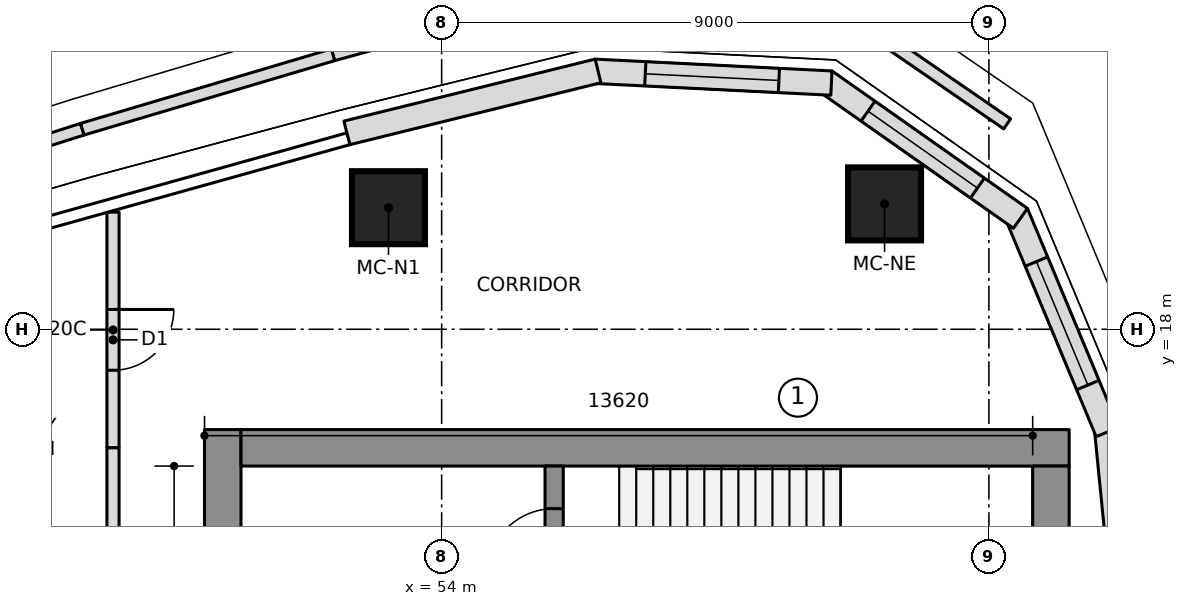
"""IFC4 building model, lengths in metres.
Left out: names, types, materials, properties, quantities, classifications, styles, units other than length and angle.
Written with IfcOpenShell. Run it as: python <this file> out.ifc"""

import sys

from ifc_helpers import new_model, si_unit, direction, frame, frame_2d, origin, origin_2d, place, context, subcontext, project, spatial, polyline, rectangle, outline, extrude, element, fill, save


model = new_model("IFC4")
c1 = context("Model", 3, precision=1e-05, world=origin(), true_north=direction((0.0, 1.0)))
c2 = subcontext(c1, "Body", "Model", "MODEL_VIEW")
j1 = project(units=[si_unit("LENGTHUNIT", "METRE"), si_unit("PLANEANGLEUNIT", "RADIAN")], contexts=[c1])
p1 = place(None, origin())
s1 = spatial("IfcSite", under=j1, at=p1, CompositionType="ELEMENT")
p2 = place(p1, origin())
s2 = spatial("IfcBuilding", under=s1, at=p2, CompositionType="ELEMENT")
p3 = place(p2, frame((0.0, 0.0, 216.2)))
s3 = spatial("IfcBuildingStorey", under=s2, at=p3, CompositionType="ELEMENT", Elevation=216.2)
p4 = place(p3, frame((50.4, 6.65, 0.0), z_axis=(0.0, 0.0, 1.0), x_axis=(0.0, 1.0, 0.0)))
e1 = element("IfcWall", 1, at=p4, inside=s3, PredefinedType="SHEAR", context=c2, shape_type="SweptSolid", body=[
    extrude(rectangle(XDim=9.7, YDim=0.6, at=frame_2d((4.85, 0.0))), origin(), (0.0, 0.0, 1.0), 4.6),
])
p5 = place(p4, frame((6.5, 0.0, 0.0)))
e2 = element("IfcOpeningElement", 2, at=p5, cuts=e1, PredefinedType="OPENING", context=c2, shape_type="SweptSolid", body=[
    extrude(rectangle(XDim=1.1, YDim=2.1, at=frame_2d((0.55, 1.05))), frame((0.0, 0.31, 0.0), z_axis=(0.0, -1.0, 0.0), x_axis=(1.0, 0.0, 0.0)), (0.0, 0.0, 1.0), 0.62),
])
p6 = place(p3, frame((50.7, 16.05, 0.0), z_axis=(0.0, 0.0, 1.0), x_axis=(1.0, 0.0, 0.0)))
e3 = element("IfcWall", 3, at=p6, inside=s3, PredefinedType="SHEAR", context=c2, shape_type="SweptSolid", body=[
    extrude(rectangle(XDim=13.62, YDim=0.6, at=frame_2d((6.81, 0.0))), origin(), (0.0, 0.0, 1.0), 4.6),
])
p7 = place(p3, frame((64.02, 7.502, 0.0), z_axis=(0.0, 0.0, 1.0), x_axis=(0.0, 1.0, 0.0)))
e4 = element("IfcWall", 4, at=p7, inside=s3, PredefinedType="SHEAR", context=c2, shape_type="SweptSolid", body=[
    extrude(rectangle(XDim=8.248, YDim=0.6, at=frame_2d((4.124, 0.0))), origin(), (0.0, 0.0, 1.0), 4.6),
])
p8 = place(p3, frame((55.85, 10.35, 0.0), z_axis=(0.0, 0.0, 1.0), x_axis=(0.0, 1.0, 0.0)))
e5 = element("IfcWall", 5, at=p8, inside=s3, PredefinedType="SHEAR", context=c2, shape_type="SweptSolid", body=[
    extrude(rectangle(XDim=5.4, YDim=0.3, at=frame_2d((2.7, 0.0))), origin(), (0.0, 0.0, 1.0), 4.6),
])
p9 = place(p8, frame((1.43, 0.0, 0.0)))
e6 = element("IfcOpeningElement", 6, at=p9, cuts=e5, PredefinedType="OPENING", context=c2, shape_type="SweptSolid", body=[
    extrude(rectangle(XDim=1.1, YDim=2.1, at=frame_2d((0.55, 1.05))), frame((0.0, 0.16, 0.0), z_axis=(0.0, -1.0, 0.0), x_axis=(1.0, 0.0, 0.0)), (0.0, 0.0, 1.0), 0.32),
])
p10 = place(p8, frame((3.6, 0.0, 0.0)))
e7 = element("IfcOpeningElement", 7, at=p10, cuts=e5, PredefinedType="OPENING", context=c2, shape_type="SweptSolid", body=[
    extrude(rectangle(XDim=1.1, YDim=2.1, at=frame_2d((0.55, 1.05))), frame((0.0, 0.16, 0.0), z_axis=(0.0, -1.0, 0.0), x_axis=(1.0, 0.0, 0.0)), (0.0, 0.0, 1.0), 0.32),
])
for number, where, z_axis, x_axis in (
    (8, (61.284, 20.062, 0.0), (0.0, 0.0, 1.0), (1.0, 0.0, 0.0)),
    (9, (53.125, 20.0, 0.0), (0.0, 0.0, 1.0), (1.0, 0.0, 0.0)),
):
    element("IfcColumn", number, at=place(p3, frame(where, z_axis=z_axis, x_axis=x_axis)), inside=s3, PredefinedType="COLUMN", context=c2, shape_type="SweptSolid", body=[
        extrude(rectangle(XDim=1.2, YDim=1.2, at=origin_2d()), origin(), (0.0, 0.0, 1.0), 4.6),
    ])
p11 = place(p3, frame((65.342, 12.264, 0.0), z_axis=(0.0, 0.0, 1.0), x_axis=(-0.098718218066, 0.995115427185, 0.0)))
e10 = element("IfcWall", 10, at=p11, inside=s3, PredefinedType="NOTDEFINED", context=c2, shape_type="SweptSolid", body=[
    extrude(outline(polyline([(-0.003, -0.2), (4.123, -0.2), (4.063, 0.2), (0.003, 0.2), (-0.003, -0.2)])), origin(), (0.0, 0.0, 1.0), 4.3),
])
p12 = place(p3, frame((64.938, 16.337, 0.0), z_axis=(0.0, 0.0, 1.0), x_axis=(-0.3844335483, 0.923152667191, 0.0)))
e11 = element("IfcWall", 11, at=p12, inside=s3, PredefinedType="NOTDEFINED", context=c2, shape_type="SweptSolid", body=[
    extrude(outline(polyline([(-0.03, -0.2), (3.871, -0.2), (3.756, 0.2), (0.03, 0.2), (-0.03, -0.2)])), origin(), (0.0, 0.0, 1.0), 4.3),
])
p13 = place(p12, frame((0.807, 0.0, 0.6)))
e12 = element("IfcOpeningElement", 12, at=p13, cuts=e11, PredefinedType="OPENING", context=c2, shape_type="SweptSolid", body=[
    extrude(outline(polyline([(0.0, 1.35), (0.084, 1.771), (0.322, 2.128), (0.679, 2.366), (1.1, 2.45), (1.521, 2.366), (1.878, 2.128), (2.116, 1.771), (2.2, 1.35), (2.2, 1.1), (2.116, 0.679), (1.878, 0.322), (1.521, 0.084), (1.1, 0.0), (0.679, 0.084), (0.322, 0.322), (0.084, 0.679), (0.0, 1.1), (0.0, 1.35)])), frame((0.0, 0.21, 0.0), z_axis=(0.0, -1.0, 0.0), x_axis=(1.0, 0.0, 0.0)), (0.0, 0.0, 1.0), 0.42),
])
p14 = place(p3, frame((63.471, 19.858, 0.0), z_axis=(0.0, 0.0, 1.0), x_axis=(-0.817942545532, 0.575299915009, 0.0)))
e13 = element("IfcWall", 13, at=p14, inside=s3, PredefinedType="NOTDEFINED", context=c2, shape_type="SweptSolid", body=[
    extrude(outline(polyline([(-0.058, -0.2), (3.871, -0.2), (3.756, 0.2), (0.058, 0.2), (-0.058, -0.2)])), origin(), (0.0, 0.0, 1.0), 4.3),
])
p15 = place(p14, frame((0.807, 0.0, 0.6)))
e14 = element("IfcOpeningElement", 14, at=p15, cuts=e13, PredefinedType="OPENING", context=c2, shape_type="SweptSolid", body=[
    extrude(outline(polyline([(0.0, 1.35), (0.084, 1.771), (0.322, 2.128), (0.679, 2.366), (1.1, 2.45), (1.521, 2.366), (1.878, 2.128), (2.116, 1.771), (2.2, 1.35), (2.2, 1.1), (2.116, 0.679), (1.878, 0.322), (1.521, 0.084), (1.1, 0.0), (0.679, 0.084), (0.322, 0.322), (0.084, 0.679), (0.0, 1.1), (0.0, 1.35)])), frame((0.0, 0.21, 0.0), z_axis=(0.0, -1.0, 0.0), x_axis=(1.0, 0.0, 0.0)), (0.0, 0.0, 1.0), 0.42),
])
p16 = place(p3, frame((60.352, 22.052, 0.0), z_axis=(0.0, 0.0, 1.0), x_axis=(-0.998758875872, 0.049806705046, 0.0)))
e15 = element("IfcWall", 15, at=p16, inside=s3, PredefinedType="NOTDEFINED", context=c2, shape_type="SweptSolid", body=[
    extrude(outline(polyline([(-0.058, -0.2), (3.843, -0.2), (3.784, 0.2), (0.058, 0.2), (-0.058, -0.2)])), origin(), (0.0, 0.0, 1.0), 4.3),
])
p17 = place(p16, frame((0.807, 0.0, 0.6)))
e16 = element("IfcOpeningElement", 16, at=p17, cuts=e15, PredefinedType="OPENING", context=c2, shape_type="SweptSolid", body=[
    extrude(outline(polyline([(0.0, 1.35), (0.084, 1.771), (0.322, 2.128), (0.679, 2.366), (1.1, 2.45), (1.521, 2.366), (1.878, 2.128), (2.116, 1.771), (2.2, 1.35), (2.2, 1.1), (2.116, 0.679), (1.878, 0.322), (1.521, 0.084), (1.1, 0.0), (0.679, 0.084), (0.322, 0.322), (0.084, 0.679), (0.0, 1.1), (0.0, 1.35)])), frame((0.0, 0.21, 0.0), z_axis=(0.0, -1.0, 0.0), x_axis=(1.0, 0.0, 0.0)), (0.0, 0.0, 1.0), 0.42),
])
p18 = place(p3, frame((56.543, 22.242, 0.0), z_axis=(0.0, 0.0, 1.0), x_axis=(-0.970902342456, -0.23947576373, 0.0)))
e17 = element("IfcWall", 17, at=p18, inside=s3, PredefinedType="NOTDEFINED", context=c2, shape_type="SweptSolid", body=[
    extrude(outline(polyline([(-0.029, -0.2), (4.226, -0.2), (4.226, 0.2), (0.029, 0.2), (-0.029, -0.2)])), origin(), (0.0, 0.0, 1.0), 4.3),
])
p19 = place(p3, frame((63.3, 21.378, 0.0), z_axis=(0.0, 0.0, 1.0), x_axis=(-0.823824636329, 0.566844748213, 0.0)))
e18 = element("IfcWall", 18, at=p19, inside=s3, PredefinedType="PARAPET", context=c2, shape_type="SweptSolid", body=[
    extrude(rectangle(XDim=3.804, YDim=0.2, at=frame_2d((1.902, 0.0))), origin(), (0.0, 0.0, 1.0), 1.1),
])
p20 = place(p3, frame((56.325, 23.645, 0.0), z_axis=(0.0, 0.0, 1.0), x_axis=(-0.964196245913, -0.265189742197, 0.0)))
e19 = element("IfcWall", 19, at=p20, inside=s3, PredefinedType="PARAPET", context=c2, shape_type="SweptSolid", body=[
    extrude(rectangle(XDim=4.265, YDim=0.2, at=frame_2d((2.133, 0.0))), origin(), (0.0, 0.0, 1.0), 1.1),
])
p21 = place(p3, frame((52.213, 22.513, 0.0), z_axis=(0.0, 0.0, 1.0), x_axis=(-0.958673228505, -0.284509474266, 0.0)))
e20 = element("IfcWall", 20, at=p21, inside=s3, PredefinedType="PARAPET", context=c2, shape_type="SweptSolid", body=[
    extrude(rectangle(XDim=4.302, YDim=0.2, at=frame_2d((2.151, 0.0))), origin(), (0.0, 0.0, 1.0), 1.1),
])
p22 = place(p3, frame((48.088, 21.289, 0.0), z_axis=(0.0, 0.0, 1.0), x_axis=(-0.952727369543, -0.303826528341, 0.0)))
e21 = element("IfcWall", 21, at=p22, inside=s3, PredefinedType="PARAPET", context=c2, shape_type="SweptSolid", body=[
    extrude(rectangle(XDim=4.303, YDim=0.2, at=frame_2d((2.151, 0.0))), origin(), (0.0, 0.0, 1.0), 1.1),
])
p23 = place(p3, frame((48.595, 19.927, 0.0), z_axis=(0.0, 0.0, 1.0), x_axis=(0.0, -1.0, 0.0)))
e22 = element("IfcWall", 22, at=p23, inside=s3, PredefinedType="PARTITIONING", context=c2, shape_type="SweptSolid", body=[
    extrude(rectangle(XDim=3.877, YDim=0.2, at=frame_2d((1.938, 0.0))), origin(), (0.0, 0.0, 1.0), 4.3),
])
p24 = place(p23, frame((1.601, 0.0, 0.0)))
e23 = element("IfcOpeningElement", 23, at=p24, cuts=e22, PredefinedType="OPENING", context=c2, shape_type="SweptSolid", body=[
    extrude(rectangle(XDim=1.0, YDim=2.1, at=frame_2d((0.5, 1.05))), frame((0.0, 0.11, 0.0), z_axis=(0.0, -1.0, 0.0), x_axis=(1.0, 0.0, 0.0)), (0.0, 0.0, 1.0), 0.22),
])
p25 = place(p3, frame((48.595, 16.05, 0.0), z_axis=(0.0, 0.0, 1.0), x_axis=(0.0, -1.0, 0.0)))
e24 = element("IfcWall", 24, at=p25, inside=s3, PredefinedType="PARTITIONING", context=c2, shape_type="SweptSolid", body=[
    extrude(rectangle(XDim=4.026, YDim=0.2, at=frame_2d((2.013, 0.0))), origin(), (0.0, 0.0, 1.0), 4.3),
])
p26 = place(p13, origin())
e25 = element("IfcWindow", 25, at=p26, inside=s3, PartitioningType="SINGLE_PANEL", PredefinedType="WINDOW", context=c2, shape_type="SweptSolid", body=[
    extrude(outline(polyline([(0.0, 1.35), (0.084, 1.771), (0.322, 2.128), (0.679, 2.366), (1.1, 2.45), (1.521, 2.366), (1.878, 2.128), (2.116, 1.771), (2.2, 1.35), (2.2, 1.1), (2.116, 0.679), (1.878, 0.322), (1.521, 0.084), (1.1, 0.0), (0.679, 0.084), (0.322, 0.322), (0.084, 0.679), (0.0, 1.1), (0.0, 1.35)])), frame((0.0, 0.17, 0.0), z_axis=(0.0, -1.0, 0.0), x_axis=(1.0, 0.0, 0.0)), (0.0, 0.0, 1.0), 0.06),
])
fill(e12, e25)
p27 = place(p15, origin())
e26 = element("IfcWindow", 26, at=p27, inside=s3, PartitioningType="SINGLE_PANEL", PredefinedType="WINDOW", context=c2, shape_type="SweptSolid", body=[
    extrude(outline(polyline([(0.0, 1.35), (0.084, 1.771), (0.322, 2.128), (0.679, 2.366), (1.1, 2.45), (1.521, 2.366), (1.878, 2.128), (2.116, 1.771), (2.2, 1.35), (2.2, 1.1), (2.116, 0.679), (1.878, 0.322), (1.521, 0.084), (1.1, 0.0), (0.679, 0.084), (0.322, 0.322), (0.084, 0.679), (0.0, 1.1), (0.0, 1.35)])), frame((0.0, 0.17, 0.0), z_axis=(0.0, -1.0, 0.0), x_axis=(1.0, 0.0, 0.0)), (0.0, 0.0, 1.0), 0.06),
])
fill(e14, e26)
p28 = place(p17, origin())
e27 = element("IfcWindow", 27, at=p28, inside=s3, PartitioningType="SINGLE_PANEL", PredefinedType="WINDOW", context=c2, shape_type="SweptSolid", body=[
    extrude(outline(polyline([(0.0, 1.35), (0.084, 1.771), (0.322, 2.128), (0.679, 2.366), (1.1, 2.45), (1.521, 2.366), (1.878, 2.128), (2.116, 1.771), (2.2, 1.35), (2.2, 1.1), (2.116, 0.679), (1.878, 0.322), (1.521, 0.084), (1.1, 0.0), (0.679, 0.084), (0.322, 0.322), (0.084, 0.679), (0.0, 1.1), (0.0, 1.35)])), frame((0.0, 0.17, 0.0), z_axis=(0.0, -1.0, 0.0), x_axis=(1.0, 0.0, 0.0)), (0.0, 0.0, 1.0), 0.06),
])
fill(e16, e27)
p29 = place(p24, origin())
e28 = element("IfcDoor", 28, at=p29, inside=s3, OperationType="SINGLE_SWING_LEFT", PredefinedType="DOOR", context=c2, shape_type="SweptSolid", body=[
    extrude(rectangle(XDim=1.0, YDim=2.1, at=frame_2d((0.5, 1.05))), frame((0.0, 0.025, 0.0), z_axis=(0.0, -1.0, 0.0), x_axis=(1.0, 0.0, 0.0)), (0.0, 0.0, 1.0), 0.05),
])
fill(e23, e28)
p30 = place(p10, origin())
e29 = element("IfcDoor", 29, at=p30, inside=s3, OperationType="SINGLE_SWING_RIGHT", PredefinedType="DOOR", context=c2, shape_type="SweptSolid", body=[
    extrude(rectangle(XDim=1.1, YDim=2.1, at=frame_2d((0.55, 1.05))), frame((0.0, 0.025, 0.0), z_axis=(0.0, -1.0, 0.0), x_axis=(1.0, 0.0, 0.0)), (0.0, 0.0, 1.0), 0.05),
])
fill(e7, e29)
save(model, sys.argv[1])
